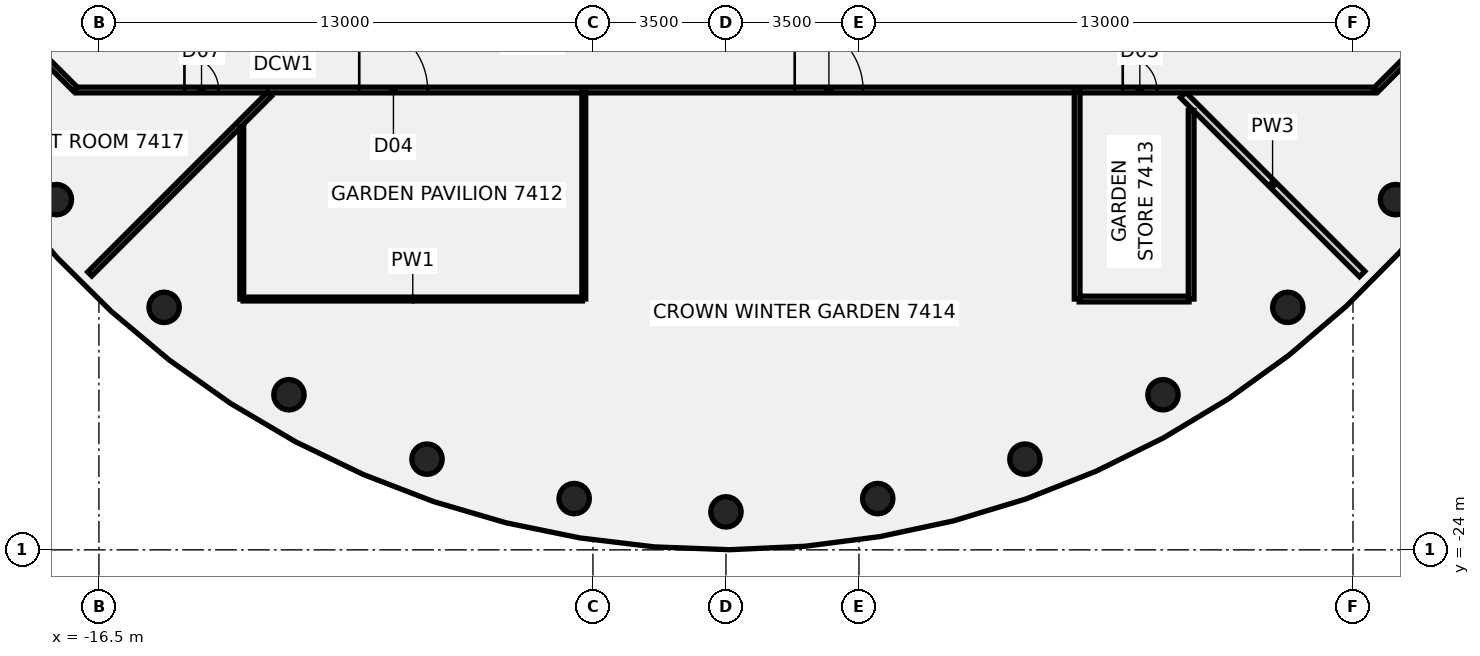
"""IFC4 building model, lengths in metres.
Left out: names, types, materials, properties, quantities, classifications, styles, units other than length and angle.
Written with IfcOpenShell. Run it as: python <this file> out.ifc"""

import sys

from ifc_helpers import new_model, si_unit, direction, frame, frame_2d, origin, origin_2d, place, context, subcontext, project, spatial, rectangle, circle, extrude, element, fill, save


model = new_model("IFC4")
c1 = context("Model", 3, precision=1e-05, world=origin(), true_north=direction((0.0, 1.0)))
c2 = subcontext(c1, "Body", "Model", "MODEL_VIEW")
j1 = project(units=[si_unit("LENGTHUNIT", "METRE"), si_unit("PLANEANGLEUNIT", "RADIAN")], contexts=[c1])
p1 = place(None, origin())
s1 = spatial("IfcSite", under=j1, at=p1, CompositionType="ELEMENT")
p2 = place(p1, origin())
s2 = spatial("IfcBuilding", under=s1, at=p2, CompositionType="ELEMENT")
p3 = place(p2, frame((0.0, 0.0, 299.4)))
s3 = spatial("IfcBuildingStorey", under=s2, at=p3, CompositionType="ELEMENT", Elevation=299.4)
for number, where, z_axis, x_axis in (
    (1, (-17.619, -14.784, -0.25), (0.0, 0.0, 1.0), (1.0, 0.0, 0.0)),
    (2, (-14.784, -17.619, -0.25), (0.0, 0.0, 1.0), (1.0, 0.0, 0.0)),
    (3, (-11.5, -19.919, -0.25), (0.0, 0.0, 1.0), (1.0, 0.0, 0.0)),
    (4, (-7.866, -21.613, -0.25), (0.0, 0.0, 1.0), (1.0, 0.0, 0.0)),
    (5, (-3.994, -22.651, -0.25), (0.0, 0.0, 1.0), (1.0, 0.0, 0.0)),
    (6, (0.0, -23.0, -0.25), (0.0, 0.0, 1.0), (1.0, 0.0, 0.0)),
    (7, (3.994, -22.651, -0.25), (0.0, 0.0, 1.0), (1.0, 0.0, 0.0)),
    (8, (7.866, -21.613, -0.25), (0.0, 0.0, 1.0), (1.0, 0.0, 0.0)),
    (9, (11.5, -19.919, -0.25), (0.0, 0.0, 1.0), (1.0, 0.0, 0.0)),
    (10, (14.784, -17.619, -0.25), (0.0, 0.0, 1.0), (1.0, 0.0, 0.0)),
    (11, (17.619, -14.784, -0.25), (0.0, 0.0, 1.0), (1.0, 0.0, 0.0)),
):
    element("IfcColumn", number, at=place(p3, frame(where, z_axis=z_axis, x_axis=x_axis)), inside=s3, PredefinedType="COLUMN", context=c2, shape_type="SweptSolid", body=[
        extrude(circle(Radius=0.4, at=origin_2d()), origin(), (0.0, 0.0, 1.0), 6.07),
    ])
p4 = place(p3, frame((-18.872, -10.128, 0.0), z_axis=(0.0, 0.0, 1.0), x_axis=(0.707106781187, -0.707106781187, 0.0)))
e12 = element("IfcWall", 12, at=p4, inside=s3, PredefinedType="PARTITIONING", context=c2, shape_type="SweptSolid", body=[
    extrude(rectangle(XDim=2.465, YDim=0.15, at=frame_2d((1.232, 0.0))), origin(), (0.0, 0.0, 1.0), 5.02),
])
p5 = place(p3, frame((12.027, -12.027, 0.0), z_axis=(0.0, 0.0, 1.0), x_axis=(0.707106781187, -0.707106781187, 0.0)))
e13 = element("IfcWall", 13, at=p5, inside=s3, PredefinedType="PARTITIONING", context=c2, shape_type="SweptSolid", body=[
    extrude(rectangle(XDim=6.665, YDim=0.2, at=frame_2d((3.333, 0.0))), origin(), (0.0, 0.0, 1.0), 5.02),
])
p6 = place(p3, frame((-17.1, -11.9, 0.0), z_axis=(0.0, 0.0, 1.0), x_axis=(1.0, 0.0, 0.0)))
e14 = element("IfcWall", 14, at=p6, inside=s3, PredefinedType="PARTITIONING", context=c2, shape_type="SweptSolid", body=[
    extrude(rectangle(XDim=34.165, YDim=0.15, at=frame_2d((17.083, 0.0))), origin(), (0.0, 0.0, 1.0), 5.02),
])
p7 = place(p6, frame((7.45, 0.0, 0.0)))
e15 = element("IfcOpeningElement", 15, at=p7, cuts=e14, PredefinedType="OPENING", context=c2, shape_type="SweptSolid", body=[
    extrude(rectangle(XDim=1.8, YDim=2.1, at=frame_2d((0.9, 1.05))), frame((0.0, 0.085, 0.0), z_axis=(0.0, -1.0, 0.0), x_axis=(1.0, 0.0, 0.0)), (0.0, 0.0, 1.0), 0.17),
])
p8 = place(p6, frame((27.541, 0.0, 0.0)))
e16 = element("IfcOpeningElement", 16, at=p8, cuts=e14, PredefinedType="OPENING", context=c2, shape_type="SweptSolid", body=[
    extrude(rectangle(XDim=0.9, YDim=2.1, at=frame_2d((0.45, 1.05))), frame((0.0, 0.085, 0.0), z_axis=(0.0, -1.0, 0.0), x_axis=(1.0, 0.0, 0.0)), (0.0, 0.0, 1.0), 0.17),
])
p9 = place(p6, frame((18.909, 0.0, 0.0)))
e17 = element("IfcOpeningElement", 17, at=p9, cuts=e14, PredefinedType="OPENING", context=c2, shape_type="SweptSolid", body=[
    extrude(rectangle(XDim=1.8, YDim=2.1, at=frame_2d((0.9, 1.05))), frame((0.0, 0.085, 0.0), z_axis=(0.0, -1.0, 0.0), x_axis=(1.0, 0.0, 0.0)), (0.0, 0.0, 1.0), 0.17),
])
p10 = place(p6, frame((2.85, 0.0, 0.0)))
e18 = element("IfcOpeningElement", 18, at=p10, cuts=e14, PredefinedType="OPENING", context=c2, shape_type="SweptSolid", body=[
    extrude(rectangle(XDim=0.9, YDim=2.1, at=frame_2d((0.45, 1.05))), frame((0.0, 0.085, 0.0), z_axis=(0.0, -1.0, 0.0), x_axis=(1.0, 0.0, 0.0)), (0.0, 0.0, 1.0), 0.17),
])
p11 = place(p3, frame((-12.706, -17.4, 0.0), z_axis=(0.0, 0.0, 1.0), x_axis=(1.0, 0.0, 0.0)))
e19 = element("IfcWall", 19, at=p11, inside=s3, PredefinedType="PARTITIONING", context=c2, shape_type="SweptSolid", body=[
    extrude(rectangle(XDim=8.93, YDim=0.1, at=frame_2d((4.465, 0.0))), origin(), (0.0, 0.0, 1.0), 5.02),
])
p12 = place(p3, frame((9.296, -17.4, 0.0), z_axis=(0.0, 0.0, 1.0), x_axis=(1.0, 0.0, 0.0)))
e20 = element("IfcWall", 20, at=p12, inside=s3, PredefinedType="PARTITIONING", context=c2, shape_type="SweptSolid", body=[
    extrude(rectangle(XDim=2.89, YDim=0.15, at=frame_2d((1.445, 0.0))), origin(), (0.0, 0.0, 1.0), 5.02),
])
p13 = place(p3, frame((-16.74, -16.74, 0.0), z_axis=(0.0, 0.0, 1.0), x_axis=(0.707106781187, 0.707106781187, 0.0)))
e21 = element("IfcWall", 21, at=p13, inside=s3, PredefinedType="PARTITIONING", context=c2, shape_type="SweptSolid", body=[
    extrude(rectangle(XDim=6.691, YDim=0.15, at=frame_2d((3.345, 0.0))), origin(), (0.0, 0.0, 1.0), 5.02),
])
p14 = place(p3, frame((17.1, -11.9, 0.0), z_axis=(0.0, 0.0, 1.0), x_axis=(0.707106781187, 0.707106781187, 0.0)))
e22 = element("IfcWall", 22, at=p14, inside=s3, PredefinedType="PARTITIONING", context=c2, shape_type="SweptSolid", body=[
    extrude(rectangle(XDim=2.505, YDim=0.15, at=frame_2d((1.253, 0.0))), origin(), (0.0, 0.0, 1.0), 5.02),
])
p15 = place(p3, frame((-12.741, -17.4, 0.0), z_axis=(0.0, 0.0, 1.0), x_axis=(0.0, 1.0, 0.0)))
e23 = element("IfcWall", 23, at=p15, inside=s3, PredefinedType="PARTITIONING", context=c2, shape_type="SweptSolid", body=[
    extrude(rectangle(XDim=4.519, YDim=0.1, at=frame_2d((2.259, 0.0))), origin(), (0.0, 0.0, 1.0), 5.02),
])
p16 = place(p3, frame((-3.741, -17.4, 0.0), z_axis=(0.0, 0.0, 1.0), x_axis=(0.0, 1.0, 0.0)))
e24 = element("IfcWall", 24, at=p16, inside=s3, PredefinedType="PARTITIONING", context=c2, shape_type="SweptSolid", body=[
    extrude(rectangle(XDim=5.445, YDim=0.1, at=frame_2d((2.722, 0.0))), origin(), (0.0, 0.0, 1.0), 5.02),
])
p17 = place(p3, frame((9.241, -17.4, 0.0), z_axis=(0.0, 0.0, 1.0), x_axis=(0.0, 1.0, 0.0)))
e25 = element("IfcWall", 25, at=p17, inside=s3, PredefinedType="PARTITIONING", context=c2, shape_type="SweptSolid", body=[
    extrude(rectangle(XDim=5.445, YDim=0.15, at=frame_2d((2.722, 0.0))), origin(), (0.0, 0.0, 1.0), 5.02),
])
p18 = place(p3, frame((12.241, -17.4, 0.0), z_axis=(0.0, 0.0, 1.0), x_axis=(0.0, 1.0, 0.0)))
e26 = element("IfcWall", 26, at=p18, inside=s3, PredefinedType="PARTITIONING", context=c2, shape_type="SweptSolid", body=[
    extrude(rectangle(XDim=4.959, YDim=0.15, at=frame_2d((2.479, 0.0))), origin(), (0.0, 0.0, 1.0), 5.02),
])
p19 = place(p7, frame((1.8, 0.0, 0.0), z_axis=(0.0, 0.0, 1.0), x_axis=(-1.0, 0.0, 0.0)))
e27 = element("IfcDoor", 27, at=p19, inside=s3, OperationType="DOUBLE_DOOR_SINGLE_SWING", PredefinedType="DOOR", context=c2, shape_type="SweptSolid", body=[
    extrude(rectangle(XDim=1.8, YDim=2.1, at=frame_2d((0.9, 1.05))), frame((0.0, 0.025, 0.0), z_axis=(0.0, -1.0, 0.0), x_axis=(1.0, 0.0, 0.0)), (0.0, 0.0, 1.0), 0.05),
])
fill(e15, e27)
p20 = place(p8, frame((0.9, 0.0, 0.0), z_axis=(0.0, 0.0, 1.0), x_axis=(-1.0, 0.0, 0.0)))
e28 = element("IfcDoor", 28, at=p20, inside=s3, OperationType="SINGLE_SWING_RIGHT", PredefinedType="DOOR", context=c2, shape_type="SweptSolid", body=[
    extrude(rectangle(XDim=0.9, YDim=2.1, at=frame_2d((0.45, 1.05))), frame((0.0, 0.025, 0.0), z_axis=(0.0, -1.0, 0.0), x_axis=(1.0, 0.0, 0.0)), (0.0, 0.0, 1.0), 0.05),
])
fill(e16, e28)
p21 = place(p9, origin())
e29 = element("IfcDoor", 29, at=p21, inside=s3, OperationType="DOUBLE_DOOR_SINGLE_SWING", PredefinedType="DOOR", context=c2, shape_type="SweptSolid", body=[
    extrude(rectangle(XDim=1.8, YDim=2.1, at=frame_2d((0.9, 1.05))), frame((0.0, 0.025, 0.0), z_axis=(0.0, -1.0, 0.0), x_axis=(1.0, 0.0, 0.0)), (0.0, 0.0, 1.0), 0.05),
])
fill(e17, e29)
p22 = place(p10, frame((0.9, 0.0, 0.0), z_axis=(0.0, 0.0, 1.0), x_axis=(-1.0, 0.0, 0.0)))
e30 = element("IfcDoor", 30, at=p22, inside=s3, OperationType="SINGLE_SWING_LEFT", PredefinedType="DOOR", context=c2, shape_type="SweptSolid", body=[
    extrude(rectangle(XDim=0.9, YDim=2.1, at=frame_2d((0.45, 1.05))), frame((0.0, 0.025, 0.0), z_axis=(0.0, -1.0, 0.0), x_axis=(1.0, 0.0, 0.0)), (0.0, 0.0, 1.0), 0.05),
])
fill(e18, e30)
save(model, sys.argv[1])
